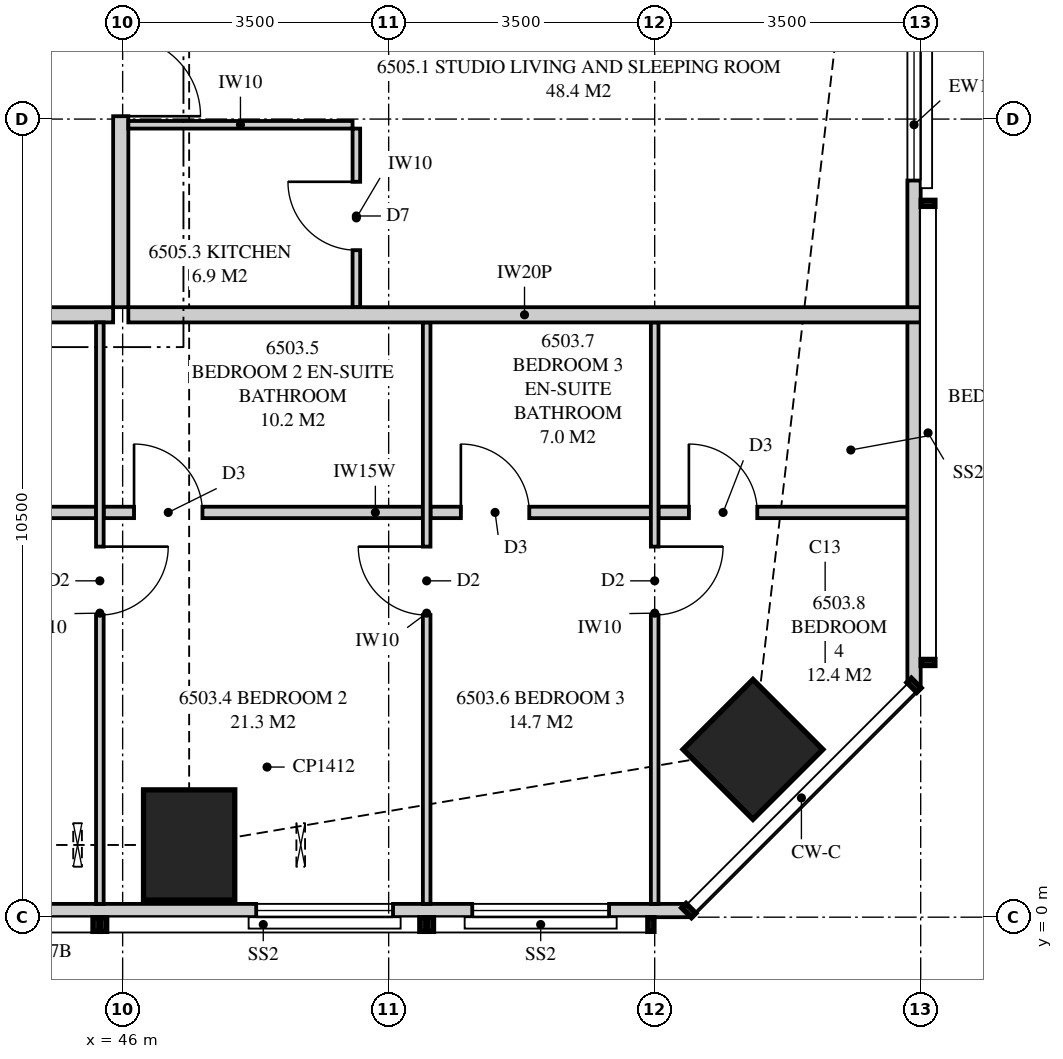
"""IFC4 building model, lengths in metres.
Left out: names, types, materials, properties, quantities, classifications, styles, units other than length and angle.
Written with IfcOpenShell. Run it as: python <this file> out.ifc"""

import sys

from ifc_helpers import new_model, si_unit, direction, frame, frame_2d, origin, origin_2d, place, context, subcontext, project, spatial, polyline, rectangle, outline, extrude, element, fill, save


model = new_model("IFC4")
c1 = context("Model", 3, precision=1e-05, world=origin(), true_north=direction((0.0, 1.0)))
c2 = subcontext(c1, "Body", "Model", "MODEL_VIEW")
j1 = project(units=[si_unit("LENGTHUNIT", "METRE"), si_unit("PLANEANGLEUNIT", "RADIAN")], contexts=[c1])
p1 = place(None, origin())
s1 = spatial("IfcSite", under=j1, at=p1, CompositionType="ELEMENT")
p2 = place(p1, origin())
s2 = spatial("IfcBuilding", under=s1, at=p2, CompositionType="ELEMENT")
p3 = place(p2, frame((0.0, 0.0, 238.95)))
s3 = spatial("IfcBuildingStorey", under=s2, at=p3, CompositionType="ELEMENT", Elevation=238.95)
p4 = place(p3, frame((46.875, 0.95, 0.0), z_axis=(0.0, 0.0, 1.0), x_axis=(0.0, 1.0, 0.0)))
e1 = element("IfcColumn", 1, at=p4, inside=s3, PredefinedType="COLUMN", context=c2, shape_type="SweptSolid", body=[
    extrude(rectangle(XDim=1.45, YDim=1.2, at=origin_2d()), origin(), (0.0, 0.0, 1.0), 3.5),
])
p5 = place(p3, frame((54.293, 2.207, 0.0), z_axis=(0.0, 0.0, 1.0), x_axis=(0.707106781187, 0.707106781187, 0.0)))
e2 = element("IfcColumn", 2, at=p5, inside=s3, PredefinedType="COLUMN", context=c2, shape_type="SweptSolid", body=[
    extrude(rectangle(XDim=1.3, YDim=1.3, at=origin_2d()), origin(), (0.0, 0.0, 1.0), 3.5),
])
p6 = place(p3, frame((36.4, 0.087, 0.0), z_axis=(0.0, 0.0, 1.0), x_axis=(1.0, 0.0, 0.0)))
e3 = element("IfcWall", 3, at=p6, inside=s3, PredefinedType="SOLIDWALL", context=c2, shape_type="SweptSolid", body=[
    extrude(outline(polyline([(0.0, 0.0), (17.049, 0.0), (17.049, 3.26), (10.69, 3.26), (10.69, 2.3), (10.606, 2.3), (10.606, 3.26), (10.475, 3.26), (10.475, 2.3), (0.0, 2.3), (0.0, 0.0)])), frame((0.0, 0.087, 0.0), z_axis=(0.0, -1.0, 0.0), x_axis=(1.0, 0.0, 0.0)), (0.0, 0.0, 1.0), 0.175),
])
p7 = place(p6, frame((1.76, 0.0, 0.4)))
e4 = element("IfcOpeningElement", 4, at=p7, cuts=e3, PredefinedType="OPENING", context=c2, shape_type="SweptSolid", body=[
    extrude(rectangle(XDim=2.4, YDim=1.85, at=frame_2d((1.2, 0.925))), frame((0.0, 0.097, 0.0), z_axis=(0.0, -1.0, 0.0), x_axis=(1.0, 0.0, 0.0)), (0.0, 0.0, 1.0), 0.195),
])
p8 = place(p6, frame((6.6, 0.0, 0.4)))
e5 = element("IfcOpeningElement", 5, at=p8, cuts=e3, PredefinedType="OPENING", context=c2, shape_type="SweptSolid", body=[
    extrude(rectangle(XDim=1.8, YDim=1.85, at=frame_2d((0.9, 0.925))), frame((0.0, 0.097, 0.0), z_axis=(0.0, -1.0, 0.0), x_axis=(1.0, 0.0, 0.0)), (0.0, 0.0, 1.0), 0.195),
])
p9 = place(p6, frame((11.357, 0.0, 0.4)))
e6 = element("IfcOpeningElement", 6, at=p9, cuts=e3, PredefinedType="OPENING", context=c2, shape_type="SweptSolid", body=[
    extrude(rectangle(XDim=1.8, YDim=1.85, at=frame_2d((0.9, 0.925))), frame((0.0, 0.097, 0.0), z_axis=(0.0, -1.0, 0.0), x_axis=(1.0, 0.0, 0.0)), (0.0, 0.0, 1.0), 0.195),
])
p10 = place(p6, frame((14.2, 0.0, 0.4)))
e7 = element("IfcOpeningElement", 7, at=p10, cuts=e3, PredefinedType="OPENING", context=c2, shape_type="SweptSolid", body=[
    extrude(rectangle(XDim=1.8, YDim=1.85, at=frame_2d((0.9, 0.925))), frame((0.0, 0.097, 0.0), z_axis=(0.0, -1.0, 0.0), x_axis=(1.0, 0.0, 0.0)), (0.0, 0.0, 1.0), 0.195),
])
p11 = place(p3, frame((56.413, 3.051, 0.0), z_axis=(0.0, 0.0, 1.0), x_axis=(0.0, 1.0, 0.0)))
e8 = element("IfcWall", 8, at=p11, inside=s3, PredefinedType="SOLIDWALL", context=c2, shape_type="SweptSolid", body=[
    extrude(outline(polyline([(0.0, 0.0), (14.749, 0.0), (14.749, 2.3), (9.949, 2.3), (9.949, 3.26), (9.858, 3.26), (9.858, 2.3), (9.688, 2.3), (9.688, 3.26), (0.0, 3.26), (0.0, 0.0)])), frame((0.0, 0.087, 0.0), z_axis=(0.0, -1.0, 0.0), x_axis=(1.0, 0.0, 0.0)), (0.0, 0.0, 1.0), 0.175),
])
p12 = place(p11, frame((6.64, 0.0, 0.4)))
e9 = element("IfcOpeningElement", 9, at=p12, cuts=e8, PredefinedType="OPENING", context=c2, shape_type="SweptSolid", body=[
    extrude(rectangle(XDim=2.4, YDim=1.85, at=frame_2d((1.2, 0.925))), frame((0.0, 0.097, 0.0), z_axis=(0.0, -1.0, 0.0), x_axis=(1.0, 0.0, 0.0)), (0.0, 0.0, 1.0), 0.195),
])
p13 = place(p11, frame((11.999, 0.0, 0.4)))
e10 = element("IfcOpeningElement", 10, at=p13, cuts=e8, PredefinedType="OPENING", context=c2, shape_type="SweptSolid", body=[
    extrude(rectangle(XDim=1.8, YDim=1.85, at=frame_2d((0.9, 0.925))), frame((0.0, 0.097, 0.0), z_axis=(0.0, -1.0, 0.0), x_axis=(1.0, 0.0, 0.0)), (0.0, 0.0, 1.0), 0.195),
])
p14 = place(p3, frame((36.55, 7.925, 0.0), z_axis=(0.0, 0.0, 1.0), x_axis=(1.0, 0.0, 0.0)))
e11 = element("IfcWall", 11, at=p14, inside=s3, PredefinedType="PARTITIONING", context=c2, shape_type="SweptSolid", body=[
    extrude(outline(polyline([(0.0, 0.0), (9.325, 0.0), (9.325, 3.26), (9.325, 2.66), (9.015, 2.66), (9.015, 3.26), (2.01, 3.26), (2.01, 2.66), (0.0, 2.66), (0.0, 3.26), (0.0, 0.0)])), frame((0.0, 0.1, 0.0), z_axis=(0.0, -1.0, 0.0), x_axis=(1.0, 0.0, 0.0)), (0.0, 0.0, 1.0), 0.2),
])
p15 = place(p14, frame((4.15, 0.0, 0.0)))
e12 = element("IfcOpeningElement", 12, at=p15, cuts=e11, PredefinedType="OPENING", context=c2, shape_type="SweptSolid", body=[
    extrude(rectangle(XDim=1.05, YDim=2.2, at=frame_2d((0.525, 1.1))), frame((0.0, 0.11, 0.0), z_axis=(0.0, -1.0, 0.0), x_axis=(1.0, 0.0, 0.0)), (0.0, 0.0, 1.0), 0.22),
])
p16 = place(p3, frame((45.7, 0.175, 0.0), z_axis=(0.0, 0.0, 1.0), x_axis=(0.0, 1.0, 0.0)))
e13 = element("IfcWall", 13, at=p16, inside=s3, PredefinedType="PARTITIONING", context=c2, shape_type="SweptSolid", body=[
    extrude(outline(polyline([(0.0, 0.0), (7.65, 0.0), (7.65, 3.26), (7.65, 2.66), (1.635, 2.66), (1.635, 2.3), (0.0, 2.3), (0.0, 3.26), (0.0, 0.0)])), frame((0.0, 0.05, 0.0), z_axis=(0.0, -1.0, 0.0), x_axis=(1.0, 0.0, 0.0)), (0.0, 0.0, 1.0), 0.1),
])
p17 = place(p16, frame((3.8, 0.0, 0.0)))
e14 = element("IfcOpeningElement", 14, at=p17, cuts=e13, PredefinedType="OPENING", context=c2, shape_type="SweptSolid", body=[
    extrude(rectangle(XDim=0.9, YDim=2.1, at=frame_2d((0.45, 1.05))), frame((0.0, 0.06, 0.0), z_axis=(0.0, -1.0, 0.0), x_axis=(1.0, 0.0, 0.0)), (0.0, 0.0, 1.0), 0.12),
])
p18 = place(p3, frame((50.0, 0.175, 0.0), z_axis=(0.0, 0.0, 1.0), x_axis=(0.0, 1.0, 0.0)))
e15 = element("IfcWall", 15, at=p18, inside=s3, PredefinedType="PARTITIONING", context=c2, shape_type="SweptSolid", body=[
    extrude(outline(polyline([(0.0, 0.0), (7.65, 0.0), (7.65, 3.26), (2.177, 3.26), (2.177, 2.3), (0.432, 2.3), (0.432, 3.26), (0.0, 3.26), (0.0, 0.0)])), frame((0.0, 0.05, 0.0), z_axis=(0.0, -1.0, 0.0), x_axis=(1.0, 0.0, 0.0)), (0.0, 0.0, 1.0), 0.1),
])
p19 = place(p18, frame((3.8, 0.0, 0.0)))
e16 = element("IfcOpeningElement", 16, at=p19, cuts=e15, PredefinedType="OPENING", context=c2, shape_type="SweptSolid", body=[
    extrude(rectangle(XDim=0.9, YDim=2.1, at=frame_2d((0.45, 1.05))), frame((0.0, 0.06, 0.0), z_axis=(0.0, -1.0, 0.0), x_axis=(1.0, 0.0, 0.0)), (0.0, 0.0, 1.0), 0.12),
])
p20 = place(p3, frame((53.0, 0.175, 0.0), z_axis=(0.0, 0.0, 1.0), x_axis=(0.0, 1.0, 0.0)))
e17 = element("IfcWall", 17, at=p20, inside=s3, PredefinedType="PARTITIONING", context=c2, shape_type="SweptSolid", body=[
    extrude(outline(polyline([(0.0, 0.0), (7.65, 0.0), (7.65, 3.26), (2.685, 3.26), (2.685, 2.3), (0.941, 2.3), (0.941, 3.26), (0.0, 3.26), (0.0, 0.0)])), frame((0.0, 0.05, 0.0), z_axis=(0.0, -1.0, 0.0), x_axis=(1.0, 0.0, 0.0)), (0.0, 0.0, 1.0), 0.1),
])
p21 = place(p20, frame((3.8, 0.0, 0.0)))
e18 = element("IfcOpeningElement", 18, at=p21, cuts=e17, PredefinedType="OPENING", context=c2, shape_type="SweptSolid", body=[
    extrude(rectangle(XDim=0.9, YDim=2.1, at=frame_2d((0.45, 1.05))), frame((0.0, 0.06, 0.0), z_axis=(0.0, -1.0, 0.0), x_axis=(1.0, 0.0, 0.0)), (0.0, 0.0, 1.0), 0.12),
])
p22 = place(p3, frame((42.15, 5.325, 0.0), z_axis=(0.0, 0.0, 1.0), x_axis=(1.0, 0.0, 0.0)))
e19 = element("IfcWall", 19, at=p22, inside=s3, PredefinedType="PLUMBINGWALL", context=c2, shape_type="SweptSolid", body=[
    extrude(outline(polyline([(0.0, 0.0), (3.5, 0.0), (3.5, 3.26), (3.5, 2.66), (3.44, 2.66), (3.44, 3.26), (0.0, 3.26), (0.0, 0.0)])), frame((0.0, 0.075, 0.0), z_axis=(0.0, -1.0, 0.0), x_axis=(1.0, 0.0, 0.0)), (0.0, 0.0, 1.0), 0.15),
])
p23 = place(p3, frame((45.75, 5.325, 0.0), z_axis=(0.0, 0.0, 1.0), x_axis=(1.0, 0.0, 0.0)))
e20 = element("IfcWall", 20, at=p23, inside=s3, PredefinedType="PLUMBINGWALL", context=c2, shape_type="SweptSolid", body=[
    extrude(outline(polyline([(0.0, 0.0), (4.2, 0.0), (4.2, 3.26), (2.41, 3.26), (2.41, 2.66), (0.0, 2.66), (0.0, 3.26), (0.0, 0.0)])), frame((0.0, 0.075, 0.0), z_axis=(0.0, -1.0, 0.0), x_axis=(1.0, 0.0, 0.0)), (0.0, 0.0, 1.0), 0.15),
])
p24 = place(p23, frame((0.4, 0.0, 0.0)))
e21 = element("IfcOpeningElement", 21, at=p24, cuts=e20, PredefinedType="OPENING", context=c2, shape_type="SweptSolid", body=[
    extrude(rectangle(XDim=0.9, YDim=2.1, at=frame_2d((0.45, 1.05))), frame((0.0, 0.085, 0.0), z_axis=(0.0, -1.0, 0.0), x_axis=(1.0, 0.0, 0.0)), (0.0, 0.0, 1.0), 0.17),
])
p25 = place(p3, frame((50.05, 5.325, 0.0), z_axis=(0.0, 0.0, 1.0), x_axis=(1.0, 0.0, 0.0)))
e22 = element("IfcWall", 22, at=p25, inside=s3, PredefinedType="PLUMBINGWALL", context=c2, shape_type="SweptSolid", body=[
    extrude(rectangle(XDim=2.9, YDim=0.15, at=frame_2d((1.45, 0.0))), origin(), (0.0, 0.0, 1.0), 3.26),
])
p26 = place(p25, frame((0.4, 0.0, 0.0)))
e23 = element("IfcOpeningElement", 23, at=p26, cuts=e22, PredefinedType="OPENING", context=c2, shape_type="SweptSolid", body=[
    extrude(rectangle(XDim=0.9, YDim=2.1, at=frame_2d((0.45, 1.05))), frame((0.0, 0.085, 0.0), z_axis=(0.0, -1.0, 0.0), x_axis=(1.0, 0.0, 0.0)), (0.0, 0.0, 1.0), 0.17),
])
p27 = place(p3, frame((53.05, 5.325, 0.0), z_axis=(0.0, 0.0, 1.0), x_axis=(1.0, 0.0, 0.0)))
e24 = element("IfcWall", 24, at=p27, inside=s3, PredefinedType="PLUMBINGWALL", context=c2, shape_type="SweptSolid", body=[
    extrude(outline(polyline([(0.0, 0.0), (3.45, 0.0), (3.45, 3.26), (2.497, 3.26), (2.497, 2.3), (0.715, 2.3), (0.715, 3.26), (0.0, 3.26), (0.0, 0.0)])), frame((0.0, 0.075, 0.0), z_axis=(0.0, -1.0, 0.0), x_axis=(1.0, 0.0, 0.0)), (0.0, 0.0, 1.0), 0.15),
])
p28 = place(p27, frame((0.4, 0.0, 0.0)))
e25 = element("IfcOpeningElement", 25, at=p28, cuts=e24, PredefinedType="OPENING", context=c2, shape_type="SweptSolid", body=[
    extrude(rectangle(XDim=0.9, YDim=2.1, at=frame_2d((0.45, 1.05))), frame((0.0, 0.085, 0.0), z_axis=(0.0, -1.0, 0.0), x_axis=(1.0, 0.0, 0.0)), (0.0, 0.0, 1.0), 0.17),
])
p29 = place(p3, frame((46.075, 7.925, 0.0), z_axis=(0.0, 0.0, 1.0), x_axis=(1.0, 0.0, 0.0)))
e26 = element("IfcWall", 26, at=p29, inside=s3, PredefinedType="PARTITIONING", context=c2, shape_type="SweptSolid", body=[
    extrude(outline(polyline([(0.0, 0.0), (10.425, 0.0), (10.425, 3.26), (9.8, 3.26), (9.8, 2.3), (7.968, 2.3), (7.968, 3.26), (2.11, 3.26), (2.11, 2.66), (0.0, 2.66), (0.0, 3.26), (0.0, 0.0)])), frame((0.0, 0.1, 0.0), z_axis=(0.0, -1.0, 0.0), x_axis=(1.0, 0.0, 0.0)), (0.0, 0.0, 1.0), 0.2),
])
p30 = place(p3, frame((45.975, 8.025, 0.0), z_axis=(0.0, 0.0, 1.0), x_axis=(0.0, 1.0, 0.0)))
e27 = element("IfcWall", 27, at=p30, inside=s3, PredefinedType="PARTITIONING", context=c2, shape_type="SweptSolid", body=[
    extrude(outline(polyline([(0.0, 0.0), (6.025, 0.0), (6.025, 3.26), (6.025, 2.66), (5.085, 2.66), (0.0, 2.66), (0.0, 3.26), (0.0, 0.0)])), frame((0.0, 0.1, 0.0), z_axis=(0.0, -1.0, 0.0), x_axis=(1.0, 0.0, 0.0)), (0.0, 0.0, 1.0), 0.2),
])
p31 = place(p30, frame((2.512, 0.0, 0.0)))
e28 = element("IfcOpeningElement", 28, at=p31, cuts=e27, PredefinedType="OPENING", context=c2, shape_type="SweptSolid", body=[
    extrude(rectangle(XDim=1.05, YDim=2.2, at=frame_2d((0.525, 1.1))), frame((0.0, 0.11, 0.0), z_axis=(0.0, -1.0, 0.0), x_axis=(1.0, 0.0, 0.0)), (0.0, 0.0, 1.0), 0.22),
])
p32 = place(p3, frame((49.075, 8.025, 0.0), z_axis=(0.0, 0.0, 1.0), x_axis=(0.0, 1.0, 0.0)))
e29 = element("IfcWall", 29, at=p32, inside=s3, PredefinedType="PARTITIONING", context=c2, shape_type="SweptSolid", body=[
    extrude(rectangle(XDim=2.35, YDim=0.1, at=frame_2d((1.175, 0.0))), origin(), (0.0, 0.0, 1.0), 3.26),
])
p33 = place(p32, frame((0.75, 0.0, 0.0)))
e30 = element("IfcOpeningElement", 30, at=p33, cuts=e29, PredefinedType="OPENING", context=c2, shape_type="SweptSolid", body=[
    extrude(rectangle(XDim=0.9, YDim=2.1, at=frame_2d((0.45, 1.05))), frame((0.0, 0.06, 0.0), z_axis=(0.0, -1.0, 0.0), x_axis=(1.0, 0.0, 0.0)), (0.0, 0.0, 1.0), 0.12),
])
p34 = place(p3, frame((49.025, 10.425, 0.0), z_axis=(0.0, 0.0, 1.0), x_axis=(-1.0, 0.0, 0.0)))
e31 = element("IfcWall", 31, at=p34, inside=s3, PredefinedType="PARTITIONING", context=c2, shape_type="SweptSolid", body=[
    extrude(outline(polyline([(0.0, 0.0), (2.95, 0.0), (2.95, 3.26), (2.95, 2.66), (0.89, 2.66), (0.89, 3.26), (0.0, 3.26), (0.0, 0.0)])), frame((0.0, 0.05, 0.0), z_axis=(0.0, -1.0, 0.0), x_axis=(1.0, 0.0, 0.0)), (0.0, 0.0, 1.0), 0.1),
])
p35 = place(p9, origin())
e32 = element("IfcWindow", 32, at=p35, inside=s3, PartitioningType="SINGLE_PANEL", PredefinedType="WINDOW", context=c2, shape_type="SweptSolid", body=[
    extrude(rectangle(XDim=1.8, YDim=1.85, at=frame_2d((0.9, 0.925))), frame((0.0, 0.03, 0.0), z_axis=(0.0, -1.0, 0.0), x_axis=(1.0, 0.0, 0.0)), (0.0, 0.0, 1.0), 0.06),
])
fill(e6, e32)
p36 = place(p10, origin())
e33 = element("IfcWindow", 33, at=p36, inside=s3, PartitioningType="SINGLE_PANEL", PredefinedType="WINDOW", context=c2, shape_type="SweptSolid", body=[
    extrude(rectangle(XDim=1.8, YDim=1.85, at=frame_2d((0.9, 0.925))), frame((0.0, 0.03, 0.0), z_axis=(0.0, -1.0, 0.0), x_axis=(1.0, 0.0, 0.0)), (0.0, 0.0, 1.0), 0.06),
])
fill(e7, e33)
p37 = place(p12, origin())
e34 = element("IfcWindow", 34, at=p37, inside=s3, PartitioningType="SINGLE_PANEL", PredefinedType="WINDOW", context=c2, shape_type="SweptSolid", body=[
    extrude(rectangle(XDim=2.4, YDim=1.85, at=frame_2d((1.2, 0.925))), frame((0.0, 0.03, 0.0), z_axis=(0.0, -1.0, 0.0), x_axis=(1.0, 0.0, 0.0)), (0.0, 0.0, 1.0), 0.06),
])
fill(e9, e34)
p38 = place(p17, frame((0.9, 0.0, 0.0), z_axis=(0.0, 0.0, 1.0), x_axis=(-1.0, 0.0, 0.0)))
e35 = element("IfcDoor", 35, at=p38, inside=s3, OperationType="SINGLE_SWING_LEFT", PredefinedType="DOOR", context=c2, shape_type="SweptSolid", body=[
    extrude(rectangle(XDim=0.9, YDim=2.1, at=frame_2d((0.45, 1.05))), frame((0.0, 0.025, 0.0), z_axis=(0.0, -1.0, 0.0), x_axis=(1.0, 0.0, 0.0)), (0.0, 0.0, 1.0), 0.05),
])
fill(e14, e35)
p39 = place(p24, origin())
e36 = element("IfcDoor", 36, at=p39, inside=s3, OperationType="SINGLE_SWING_LEFT", PredefinedType="DOOR", context=c2, shape_type="SweptSolid", body=[
    extrude(rectangle(XDim=0.9, YDim=2.1, at=frame_2d((0.45, 1.05))), frame((0.0, 0.025, 0.0), z_axis=(0.0, -1.0, 0.0), x_axis=(1.0, 0.0, 0.0)), (0.0, 0.0, 1.0), 0.05),
])
fill(e21, e36)
p40 = place(p19, origin())
e37 = element("IfcDoor", 37, at=p40, inside=s3, OperationType="SINGLE_SWING_RIGHT", PredefinedType="DOOR", context=c2, shape_type="SweptSolid", body=[
    extrude(rectangle(XDim=0.9, YDim=2.1, at=frame_2d((0.45, 1.05))), frame((0.0, 0.025, 0.0), z_axis=(0.0, -1.0, 0.0), x_axis=(1.0, 0.0, 0.0)), (0.0, 0.0, 1.0), 0.05),
])
fill(e16, e37)
p41 = place(p26, origin())
e38 = element("IfcDoor", 38, at=p41, inside=s3, OperationType="SINGLE_SWING_LEFT", PredefinedType="DOOR", context=c2, shape_type="SweptSolid", body=[
    extrude(rectangle(XDim=0.9, YDim=2.1, at=frame_2d((0.45, 1.05))), frame((0.0, 0.025, 0.0), z_axis=(0.0, -1.0, 0.0), x_axis=(1.0, 0.0, 0.0)), (0.0, 0.0, 1.0), 0.05),
])
fill(e23, e38)
p42 = place(p21, frame((0.9, 0.0, 0.0), z_axis=(0.0, 0.0, 1.0), x_axis=(-1.0, 0.0, 0.0)))
e39 = element("IfcDoor", 39, at=p42, inside=s3, OperationType="SINGLE_SWING_LEFT", PredefinedType="DOOR", context=c2, shape_type="SweptSolid", body=[
    extrude(rectangle(XDim=0.9, YDim=2.1, at=frame_2d((0.45, 1.05))), frame((0.0, 0.025, 0.0), z_axis=(0.0, -1.0, 0.0), x_axis=(1.0, 0.0, 0.0)), (0.0, 0.0, 1.0), 0.05),
])
fill(e18, e39)
p43 = place(p28, origin())
e40 = element("IfcDoor", 40, at=p43, inside=s3, OperationType="SINGLE_SWING_LEFT", PredefinedType="DOOR", context=c2, shape_type="SweptSolid", body=[
    extrude(rectangle(XDim=0.9, YDim=2.1, at=frame_2d((0.45, 1.05))), frame((0.0, 0.025, 0.0), z_axis=(0.0, -1.0, 0.0), x_axis=(1.0, 0.0, 0.0)), (0.0, 0.0, 1.0), 0.05),
])
fill(e25, e40)
p44 = place(p31, frame((1.05, 0.0, 0.0), z_axis=(0.0, 0.0, 1.0), x_axis=(-1.0, 0.0, 0.0)))
e41 = element("IfcDoor", 41, at=p44, inside=s3, OperationType="SINGLE_SWING_RIGHT", PredefinedType="DOOR", context=c2, shape_type="SweptSolid", body=[
    extrude(rectangle(XDim=1.05, YDim=2.2, at=frame_2d((0.525, 1.1))), frame((0.0, 0.025, 0.0), z_axis=(0.0, -1.0, 0.0), x_axis=(1.0, 0.0, 0.0)), (0.0, 0.0, 1.0), 0.05),
])
fill(e28, e41)
p45 = place(p33, origin())
e42 = element("IfcDoor", 42, at=p45, inside=s3, OperationType="SINGLE_SWING_RIGHT", PredefinedType="DOOR", context=c2, shape_type="SweptSolid", body=[
    extrude(rectangle(XDim=0.9, YDim=2.1, at=frame_2d((0.45, 1.05))), frame((0.0, 0.025, 0.0), z_axis=(0.0, -1.0, 0.0), x_axis=(1.0, 0.0, 0.0)), (0.0, 0.0, 1.0), 0.05),
])
fill(e30, e42)
save(model, sys.argv[1])
